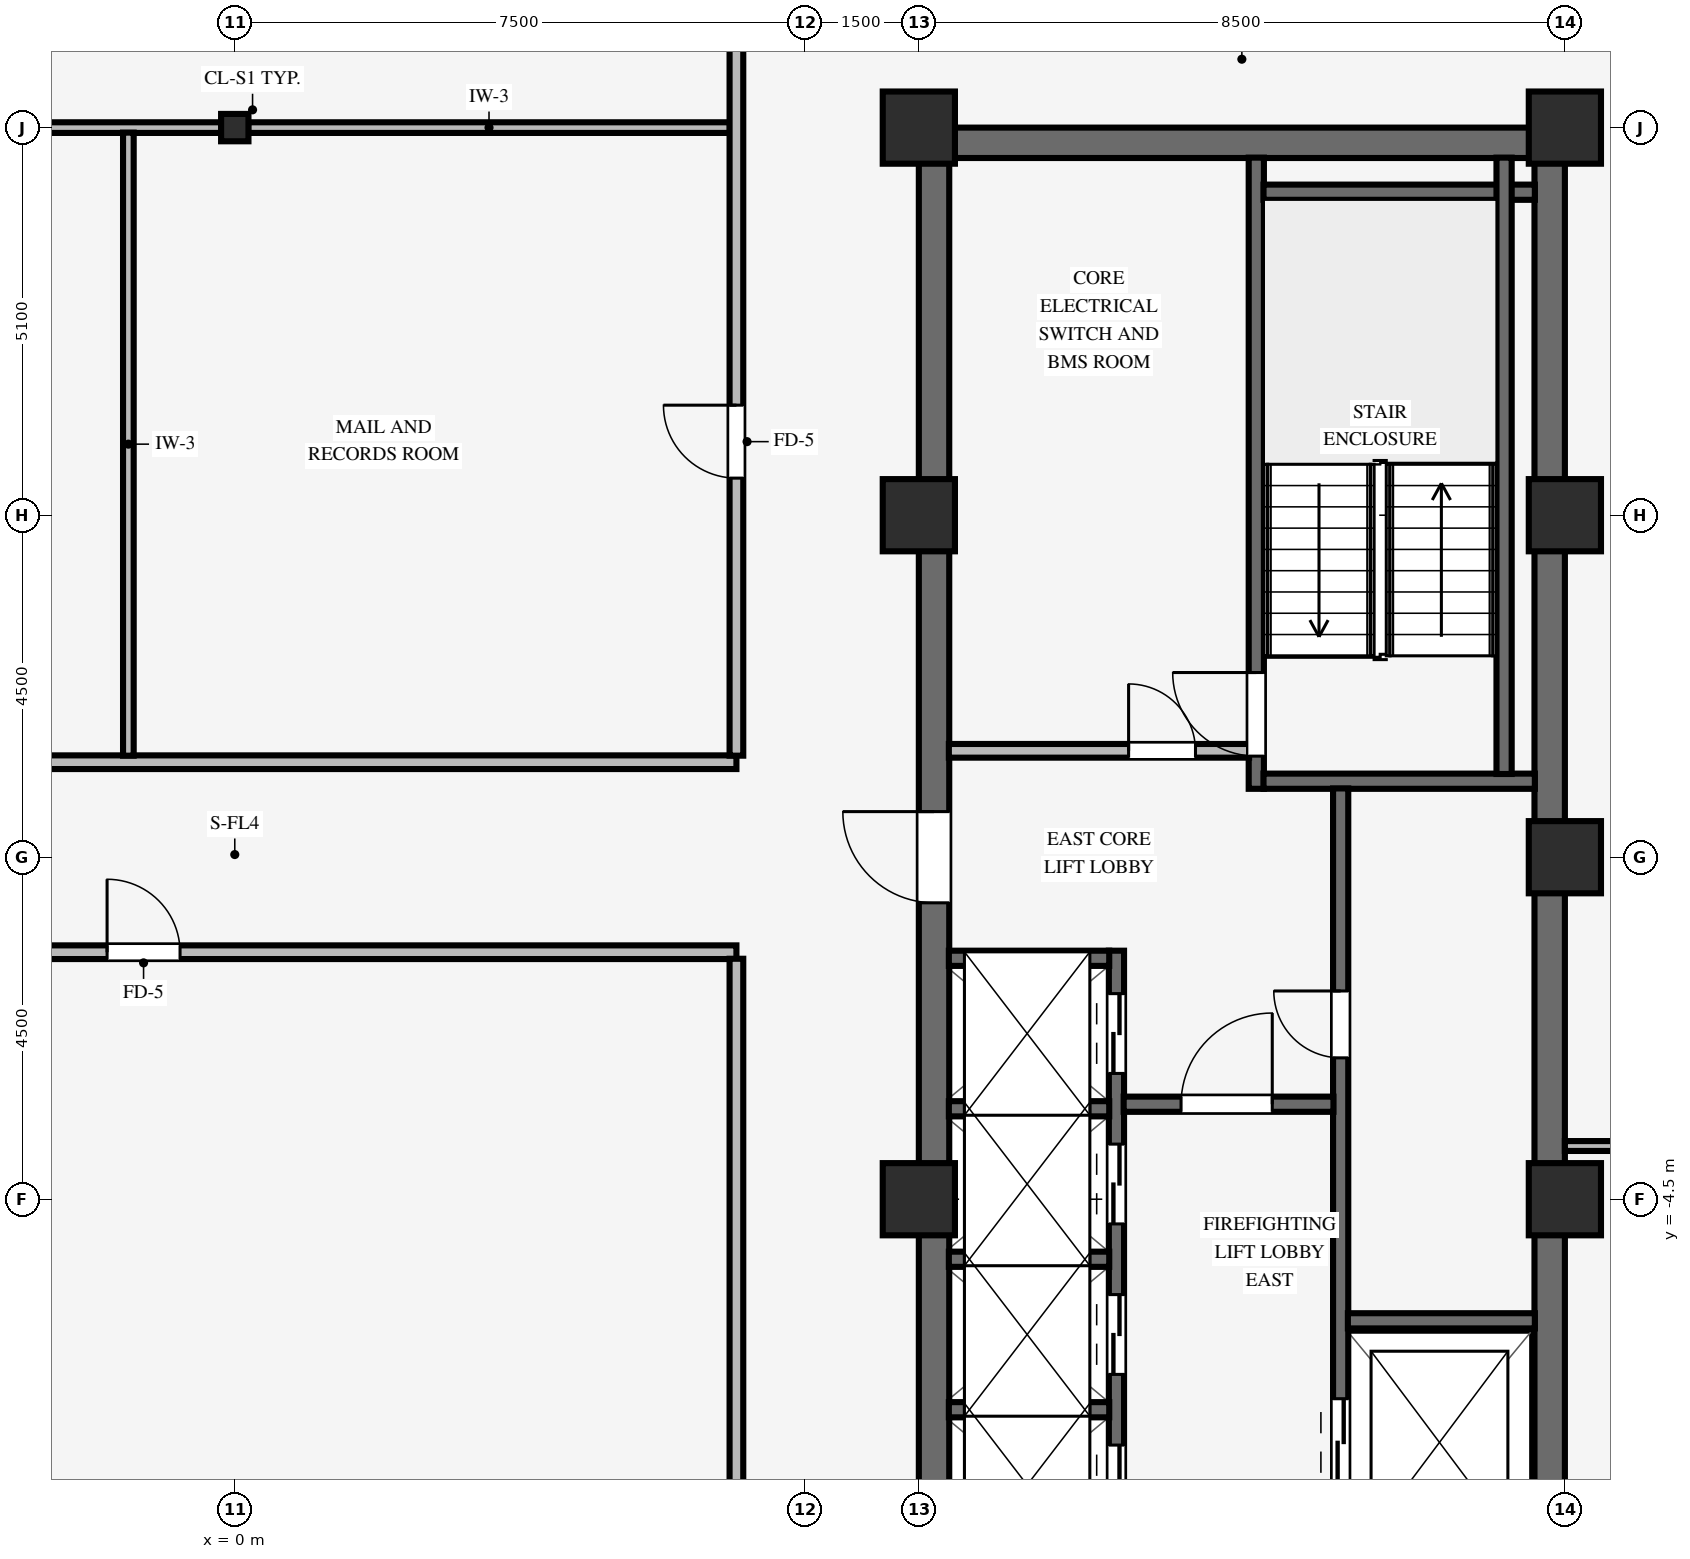
"""IFC4 building model, lengths in metres.
Left out: names, types, materials, properties, quantities, classifications, styles, units other than length and angle.
Written with IfcOpenShell. Run it as: python <this file> out.ifc"""

import sys

from ifc_helpers import new_model, si_unit, direction, frame, frame_2d, origin, origin_2d, place, context, subcontext, project, spatial, rectangle, i_section, extrude, source, transform, mapped, element, fill, save


model = new_model("IFC4")
c1 = context("Model", 3, precision=1e-05, world=origin(), true_north=direction((0.0, 1.0)))
c2 = subcontext(c1, "Body", "Model", "MODEL_VIEW")
j1 = project(units=[si_unit("LENGTHUNIT", "METRE"), si_unit("PLANEANGLEUNIT", "RADIAN")], contexts=[c1])
p1 = place(None, origin())
s1 = spatial("IfcSite", under=j1, at=p1, CompositionType="ELEMENT")
p2 = place(p1, origin())
s2 = spatial("IfcBuilding", under=s1, at=p2, CompositionType="ELEMENT")
p3 = place(p2, frame((0.0, 0.0, 134.8)))
s3 = spatial("IfcBuildingStorey", under=s2, at=p3, CompositionType="ELEMENT", Elevation=134.8)
p4 = place(p3, frame((9.0, 9.4, 0.0), z_axis=(0.0, 0.0, 1.0), x_axis=(1.0, 0.0, 0.0)))
e1 = element("IfcWall", 1, at=p4, inside=s3, PredefinedType="SHEAR", context=c2, shape_type="SweptSolid", body=[
    extrude(rectangle(XDim=8.5, YDim=0.4, at=frame_2d((4.25, 0.0))), origin(), (0.0, 0.0, 1.0), 3.37),
])
p5 = place(p3, frame((9.2, -9.205, 0.0), z_axis=(0.0, 0.0, 1.0), x_axis=(0.0, 1.0, 0.0)))
e2 = element("IfcWall", 2, at=p5, inside=s3, PredefinedType="SHEAR", context=c2, shape_type="SweptSolid", body=[
    extrude(rectangle(XDim=18.41, YDim=0.4, at=frame_2d((9.205, 0.0))), origin(), (0.0, 0.0, 1.0), 3.37),
])
p6 = place(p5, frame((8.605, 0.0, 0.0)))
e3 = element("IfcOpeningElement", 3, at=p6, cuts=e2, PredefinedType="OPENING", context=c2, shape_type="SweptSolid", body=[
    extrude(rectangle(XDim=1.2, YDim=2.15, at=frame_2d((0.6, 1.075))), frame((0.0, 0.21, 0.0), z_axis=(0.0, -1.0, 0.0), x_axis=(1.0, 0.0, 0.0)), (0.0, 0.0, 1.0), 0.42),
])
p7 = place(p3, frame((17.3, -9.205, 0.0), z_axis=(0.0, 0.0, 1.0), x_axis=(0.0, 1.0, 0.0)))
e4 = element("IfcWall", 4, at=p7, inside=s3, PredefinedType="SHEAR", context=c2, shape_type="SweptSolid", body=[
    extrude(rectangle(XDim=18.41, YDim=0.4, at=frame_2d((9.205, 0.0))), origin(), (0.0, 0.0, 1.0), 3.37),
])
for number, where, z_axis, x_axis in (
    (5, (9.0, -4.5, 0.0), (0.0, 0.0, 1.0), (1.0, 0.0, 0.0)),
    (6, (9.0, 4.5, 0.0), (0.0, 0.0, 1.0), (1.0, 0.0, 0.0)),
    (7, (9.0, 9.6, 0.0), (0.0, 0.0, 1.0), (1.0, 0.0, 0.0)),
    (8, (17.5, -4.5, 0.0), (0.0, 0.0, 1.0), (1.0, 0.0, 0.0)),
    (9, (17.5, 4.5, 0.0), (0.0, 0.0, 1.0), (1.0, 0.0, 0.0)),
    (10, (17.5, 9.6, 0.0), (0.0, 0.0, 1.0), (1.0, 0.0, 0.0)),
    (11, (17.5, 0.0, 0.0), (0.0, 0.0, 1.0), (1.0, 0.0, 0.0)),
):
    element("IfcColumn", number, at=place(p3, frame(where, z_axis=z_axis, x_axis=x_axis)), inside=s3, PredefinedType="COLUMN", context=c2, shape_type="SweptSolid", body=[
        extrude(rectangle(XDim=0.95, YDim=0.95, at=origin_2d()), origin(), (0.0, 0.0, 1.0), 3.37),
    ])
p8 = place(p3, frame((0.0, 9.6, 0.0), z_axis=(0.0, 0.0, 1.0), x_axis=(1.0, 0.0, 0.0)))
e12 = element("IfcColumn", 12, at=p8, inside=s3, PredefinedType="COLUMN", context=c2, shape_type="SweptSolid", body=[
    extrude(i_section(OverallWidth=0.36, OverallDepth=0.36, WebThickness=0.021, FlangeThickness=0.021, FilletRadius=0.018, at=origin_2d()), origin(), (0.0, 0.0, 1.0), 3.37),
])
p9 = place(p3, frame((13.44, 0.9, 0.0), z_axis=(0.0, 0.0, 1.0), x_axis=(0.0, 1.0, 0.0)))
e13 = element("IfcWall", 13, at=p9, inside=s3, PredefinedType="SHEAR", context=c2, shape_type="SweptSolid", body=[
    extrude(rectangle(XDim=8.305, YDim=0.2, at=frame_2d((4.153, 0.0))), origin(), (0.0, 0.0, 1.0), 3.37),
])
p10 = place(p9, frame((0.43, 0.0, 0.0)))
e14 = element("IfcOpeningElement", 14, at=p10, cuts=e13, PredefinedType="OPENING", context=c2, shape_type="SweptSolid", body=[
    extrude(rectangle(XDim=1.1, YDim=2.15, at=frame_2d((0.55, 1.075))), frame((0.0, 0.11, 0.0), z_axis=(0.0, -1.0, 0.0), x_axis=(1.0, 0.0, 0.0)), (0.0, 0.0, 1.0), 0.22),
])
for number, where, z_axis, x_axis in (
    (15, (13.535, 1.0, 0.0), (0.0, 0.0, 1.0), (1.0, 0.0, 0.0)),
    (16, (13.535, 8.75, 0.0), (0.0, 0.0, 1.0), (1.0, 0.0, 0.0)),
):
    element("IfcWall", number, at=place(p3, frame(where, z_axis=z_axis, x_axis=x_axis)), inside=s3, PredefinedType="SHEAR", context=c2, shape_type="SweptSolid", body=[
        extrude(rectangle(XDim=3.57, YDim=0.2, at=frame_2d((1.785, 0.0))), origin(), (0.0, 0.0, 1.0), 3.37),
    ])
p11 = place(p3, frame((16.7, 1.095, 0.0), z_axis=(0.0, 0.0, 1.0), x_axis=(0.0, 1.0, 0.0)))
e17 = element("IfcWall", 17, at=p11, inside=s3, PredefinedType="SHEAR", context=c2, shape_type="SweptSolid", body=[
    extrude(rectangle(XDim=8.11, YDim=0.2, at=frame_2d((4.055, 0.0))), origin(), (0.0, 0.0, 1.0), 3.37),
])
p12 = place(p3, frame((14.55, -9.205, 0.0), z_axis=(0.0, 0.0, 1.0), x_axis=(0.0, 1.0, 0.0)))
e18 = element("IfcWall", 18, at=p12, inside=s3, PredefinedType="SHEAR", context=c2, shape_type="SweptSolid", body=[
    extrude(rectangle(XDim=10.11, YDim=0.2, at=frame_2d((5.055, 0.0))), origin(), (0.0, 0.0, 1.0), 3.37),
])
p13 = place(p12, frame((6.565, 0.0, 0.0)))
e19 = element("IfcOpeningElement", 19, at=p13, cuts=e18, PredefinedType="OPENING", context=c2, shape_type="SweptSolid", body=[
    extrude(rectangle(XDim=0.88, YDim=2.1, at=frame_2d((0.44, 1.05))), frame((0.0, 0.11, 0.0), z_axis=(0.0, -1.0, 0.0), x_axis=(1.0, 0.0, 0.0)), (0.0, 0.0, 1.0), 0.22),
])
p14 = place(p12, frame((0.93, 0.0, 0.0)))
e20 = element("IfcOpeningElement", 20, at=p14, cuts=e18, PredefinedType="OPENING", context=c2, shape_type="SweptSolid", body=[
    extrude(rectangle(XDim=1.15, YDim=2.15, at=frame_2d((0.575, 1.075))), frame((0.0, 0.11, 0.0), z_axis=(0.0, -1.0, 0.0), x_axis=(1.0, 0.0, 0.0)), (0.0, 0.0, 1.0), 0.22),
])
p15 = place(p3, frame((14.645, -6.1, 0.0), z_axis=(0.0, 0.0, 1.0), x_axis=(1.0, 0.0, 0.0)))
e21 = element("IfcWall", 21, at=p15, inside=s3, PredefinedType="SHEAR", context=c2, shape_type="SweptSolid", body=[
    extrude(rectangle(XDim=2.46, YDim=0.2, at=frame_2d((1.23, 0.0))), origin(), (0.0, 0.0, 1.0), 3.37),
])
p16 = place(p3, frame((11.6, -9.205, 0.0), z_axis=(0.0, 0.0, 1.0), x_axis=(0.0, 1.0, 0.0)))
e22 = element("IfcWall", 22, at=p16, inside=s3, PredefinedType="SHEAR", context=c2, shape_type="SweptSolid", body=[
    extrude(rectangle(XDim=7.975, YDim=0.2, at=frame_2d((3.988, 0.0))), origin(), (0.0, 0.0, 1.0), 3.37),
])
p17 = place(p16, frame((0.42, 0.0, 0.0)))
e23 = element("IfcOpeningElement", 23, at=p17, cuts=e22, PredefinedType="OPENING", context=c2, shape_type="SweptSolid", body=[
    extrude(rectangle(XDim=1.05, YDim=2.15, at=frame_2d((0.525, 1.075))), frame((0.0, 0.11, 0.0), z_axis=(0.0, -1.0, 0.0), x_axis=(1.0, 0.0, 0.0)), (0.0, 0.0, 1.0), 0.22),
])
p18 = place(p16, frame((2.4, 0.0, 0.0)))
e24 = element("IfcOpeningElement", 24, at=p18, cuts=e22, PredefinedType="OPENING", context=c2, shape_type="SweptSolid", body=[
    extrude(rectangle(XDim=1.05, YDim=2.15, at=frame_2d((0.525, 1.075))), frame((0.0, 0.11, 0.0), z_axis=(0.0, -1.0, 0.0), x_axis=(1.0, 0.0, 0.0)), (0.0, 0.0, 1.0), 0.22),
])
p19 = place(p16, frame((4.38, 0.0, 0.0)))
e25 = element("IfcOpeningElement", 25, at=p19, cuts=e22, PredefinedType="OPENING", context=c2, shape_type="SweptSolid", body=[
    extrude(rectangle(XDim=1.05, YDim=2.15, at=frame_2d((0.525, 1.075))), frame((0.0, 0.11, 0.0), z_axis=(0.0, -1.0, 0.0), x_axis=(1.0, 0.0, 0.0)), (0.0, 0.0, 1.0), 0.22),
])
p20 = place(p16, frame((6.36, 0.0, 0.0)))
e26 = element("IfcOpeningElement", 26, at=p20, cuts=e22, PredefinedType="OPENING", context=c2, shape_type="SweptSolid", body=[
    extrude(rectangle(XDim=1.05, YDim=2.15, at=frame_2d((0.525, 1.075))), frame((0.0, 0.11, 0.0), z_axis=(0.0, -1.0, 0.0), x_axis=(1.0, 0.0, 0.0)), (0.0, 0.0, 1.0), 0.22),
])
p21 = place(p3, frame((11.695, -3.25, 0.0), z_axis=(0.0, 0.0, 1.0), x_axis=(1.0, 0.0, 0.0)))
e27 = element("IfcWall", 27, at=p21, inside=s3, PredefinedType="SHEAR", context=c2, shape_type="SweptSolid", body=[
    extrude(rectangle(XDim=2.76, YDim=0.2, at=frame_2d((1.38, 0.0))), origin(), (0.0, 0.0, 1.0), 3.37),
])
p22 = place(p21, frame((0.755, 0.0, 0.0)))
e28 = element("IfcOpeningElement", 28, at=p22, cuts=e27, PredefinedType="OPENING", context=c2, shape_type="SweptSolid", body=[
    extrude(rectangle(XDim=1.2, YDim=2.15, at=frame_2d((0.6, 1.075))), frame((0.0, 0.11, 0.0), z_axis=(0.0, -1.0, 0.0), x_axis=(1.0, 0.0, 0.0)), (0.0, 0.0, 1.0), 0.22),
])
for number, where, z_axis, x_axis in (
    (29, (9.395, -7.27, 0.0), (0.0, 0.0, 1.0), (1.0, 0.0, 0.0)),
    (30, (9.395, -5.29, 0.0), (0.0, 0.0, 1.0), (1.0, 0.0, 0.0)),
    (31, (9.395, -3.31, 0.0), (0.0, 0.0, 1.0), (1.0, 0.0, 0.0)),
    (32, (9.395, -1.33, 0.0), (0.0, 0.0, 1.0), (1.0, 0.0, 0.0)),
):
    element("IfcWall", number, at=place(p3, frame(where, z_axis=z_axis, x_axis=x_axis)), inside=s3, PredefinedType="SHEAR", context=c2, shape_type="SweptSolid", body=[
        extrude(rectangle(XDim=2.11, YDim=0.2, at=frame_2d((1.055, 0.0))), origin(), (0.0, 0.0, 1.0), 3.37),
    ])
p23 = place(p3, frame((9.395, 1.4, 0.0), z_axis=(0.0, 0.0, 1.0), x_axis=(1.0, 0.0, 0.0)))
e33 = element("IfcWall", 33, at=p23, inside=s3, PredefinedType="PARTITIONING", context=c2, shape_type="SweptSolid", body=[
    extrude(rectangle(XDim=3.95, YDim=0.18, at=frame_2d((1.975, 0.0))), origin(), (0.0, 0.0, 1.0), 3.36),
])
p24 = place(p23, frame((2.365, 0.0, 0.0)))
e34 = element("IfcOpeningElement", 34, at=p24, cuts=e33, PredefinedType="OPENING", context=c2, shape_type="SweptSolid", body=[
    extrude(rectangle(XDim=0.88, YDim=2.1, at=frame_2d((0.44, 1.05))), frame((0.0, 0.1, 0.0), z_axis=(0.0, -1.0, 0.0), x_axis=(1.0, 0.0, 0.0)), (0.0, 0.0, 1.0), 0.2),
])
p25 = place(p3, frame((17.5, -3.8, 0.0), z_axis=(0.0, 0.0, 1.0), x_axis=(1.0, 0.0, 0.0)))
e35 = element("IfcWall", 35, at=p25, inside=s3, PredefinedType="PARTITIONING", context=c2, shape_type="SweptSolid", body=[
    extrude(rectangle(XDim=8.58, YDim=0.13, at=frame_2d((4.29, 0.0))), origin(), (0.0, 0.0, 1.0), 3.36),
])
p26 = place(p3, frame((-9.0, -1.25, 0.0), z_axis=(0.0, 0.0, 1.0), x_axis=(1.0, 0.0, 0.0)))
e36 = element("IfcWall", 36, at=p26, inside=s3, PredefinedType="PARTITIONING", context=c2, shape_type="SweptSolid", body=[
    extrude(rectangle(XDim=15.6, YDim=0.18, at=frame_2d((7.8, 0.0))), origin(), (0.0, 0.0, 1.0), 3.36),
])
p27 = place(p26, frame((7.32, 0.0, 0.0)))
e37 = element("IfcOpeningElement", 37, at=p27, cuts=e36, PredefinedType="OPENING", context=c2, shape_type="SweptSolid", body=[
    extrude(rectangle(XDim=0.96, YDim=2.1, at=frame_2d((0.48, 1.05))), frame((0.0, 0.1, 0.0), z_axis=(0.0, -1.0, 0.0), x_axis=(1.0, 0.0, 0.0)), (0.0, 0.0, 1.0), 0.2),
])
p28 = place(p3, frame((-9.0, 1.25, 0.0), z_axis=(0.0, 0.0, 1.0), x_axis=(1.0, 0.0, 0.0)))
e38 = element("IfcWall", 38, at=p28, inside=s3, PredefinedType="PARTITIONING", context=c2, shape_type="SweptSolid", body=[
    extrude(rectangle(XDim=15.6, YDim=0.18, at=frame_2d((7.8, 0.0))), origin(), (0.0, 0.0, 1.0), 3.36),
])
p29 = place(p28, frame((3.32, 0.0, 0.0)))
e39 = element("IfcOpeningElement", 39, at=p29, cuts=e38, PredefinedType="OPENING", context=c2, shape_type="SweptSolid", body=[
    extrude(rectangle(XDim=0.96, YDim=2.1, at=frame_2d((0.48, 1.05))), frame((0.0, 0.1, 0.0), z_axis=(0.0, -1.0, 0.0), x_axis=(1.0, 0.0, 0.0)), (0.0, 0.0, 1.0), 0.2),
])
p30 = place(p3, frame((-8.529, 9.6, 0.0), z_axis=(0.0, 0.0, 1.0), x_axis=(1.0, 0.0, 0.0)))
e40 = element("IfcWall", 40, at=p30, inside=s3, PredefinedType="PARTITIONING", context=c2, shape_type="SweptSolid", body=[
    extrude(rectangle(XDim=8.353, YDim=0.14, at=frame_2d((4.177, 0.0))), origin(), (0.0, 0.0, 1.0), 2.405),
])
p31 = place(p3, frame((0.176, 9.6, 0.0), z_axis=(0.0, 0.0, 1.0), x_axis=(1.0, 0.0, 0.0)))
e41 = element("IfcWall", 41, at=p31, inside=s3, PredefinedType="PARTITIONING", context=c2, shape_type="SweptSolid", body=[
    extrude(rectangle(XDim=6.338, YDim=0.14, at=frame_2d((3.169, 0.0))), origin(), (0.0, 0.0, 1.0), 2.405),
])
p32 = place(p3, frame((-1.4, 1.336, 0.0), z_axis=(0.0, 0.0, 1.0), x_axis=(0.0, 1.0, 0.0)))
e42 = element("IfcWall", 42, at=p32, inside=s3, PredefinedType="PARTITIONING", context=c2, shape_type="SweptSolid", body=[
    extrude(rectangle(XDim=8.198, YDim=0.14, at=frame_2d((4.099, 0.0))), origin(), (0.0, 0.0, 1.0), 3.36),
])
p33 = place(p3, frame((6.6, -13.414, 0.0), z_axis=(0.0, 0.0, 1.0), x_axis=(0.0, 1.0, 0.0)))
e43 = element("IfcWall", 43, at=p33, inside=s3, PredefinedType="PARTITIONING", context=c2, shape_type="SweptSolid", body=[
    extrude(rectangle(XDim=12.078, YDim=0.18, at=frame_2d((6.039, 0.0))), origin(), (0.0, 0.0, 1.0), 3.36),
])
p34 = place(p3, frame((6.6, 1.336, 0.0), z_axis=(0.0, 0.0, 1.0), x_axis=(0.0, 1.0, 0.0)))
e44 = element("IfcWall", 44, at=p34, inside=s3, PredefinedType="PARTITIONING", context=c2, shape_type="SweptSolid", body=[
    extrude(rectangle(XDim=12.078, YDim=0.18, at=frame_2d((6.039, 0.0))), origin(), (0.0, 0.0, 1.0), 3.36),
])
p35 = place(p34, frame((3.652, 0.0, 0.0)))
e45 = element("IfcOpeningElement", 45, at=p35, cuts=e44, PredefinedType="OPENING", context=c2, shape_type="SweptSolid", body=[
    extrude(rectangle(XDim=0.96, YDim=2.1, at=frame_2d((0.48, 1.05))), frame((0.0, 0.1, 0.0), z_axis=(0.0, -1.0, 0.0), x_axis=(1.0, 0.0, 0.0)), (0.0, 0.0, 1.0), 0.2),
])
m1 = source(origin(), c2, "Body", "SweptSolid", [
    extrude(rectangle(XDim=1.1, YDim=2.15, at=frame_2d((0.55, 1.075))), frame((0.0, 0.025, 0.0), z_axis=(0.0, -1.0, 0.0), x_axis=(1.0, 0.0, 0.0)), (0.0, 0.0, 1.0), 0.05),
])
p36 = place(p10, origin())
e46 = element("IfcDoor", 46, at=p36, inside=s3, OperationType="SINGLE_SWING_RIGHT", PredefinedType="DOOR", context=c2, shape_type="MappedRepresentation", body=[
    mapped(m1, transform((0.0, 0.0, 0.0), scale=1.0)),
])
fill(e14, e46)
m2 = source(origin(), c2, "Body", "SweptSolid", [
    extrude(rectangle(XDim=0.88, YDim=2.1, at=frame_2d((0.44, 1.05))), frame((0.0, 0.025, 0.0), z_axis=(0.0, -1.0, 0.0), x_axis=(1.0, 0.0, 0.0)), (0.0, 0.0, 1.0), 0.05),
])
p37 = place(p13, origin())
e47 = element("IfcDoor", 47, at=p37, inside=s3, OperationType="SINGLE_SWING_RIGHT", PredefinedType="DOOR", context=c2, shape_type="MappedRepresentation", body=[
    mapped(m2, transform((0.0, 0.0, 0.0), scale=1.0)),
])
fill(e19, e47)
m3 = source(origin(), c2, "Body", "SweptSolid", [
    extrude(rectangle(XDim=1.2, YDim=2.15, at=frame_2d((0.6, 1.075))), frame((0.0, 0.025, 0.0), z_axis=(0.0, -1.0, 0.0), x_axis=(1.0, 0.0, 0.0)), (0.0, 0.0, 1.0), 0.05),
])
p38 = place(p22, origin())
e48 = element("IfcDoor", 48, at=p38, inside=s3, OperationType="SINGLE_SWING_RIGHT", PredefinedType="DOOR", context=c2, shape_type="MappedRepresentation", body=[
    mapped(m3, transform((0.0, 0.0, 0.0), scale=1.0)),
])
fill(e28, e48)
p39 = place(p6, origin())
e49 = element("IfcDoor", 49, at=p39, inside=s3, OperationType="SINGLE_SWING_RIGHT", PredefinedType="DOOR", context=c2, shape_type="MappedRepresentation", body=[
    mapped(m3, transform((0.0, 0.0, 0.0), scale=1.0)),
])
fill(e3, e49)
p40 = place(p24, origin())
e50 = element("IfcDoor", 50, at=p40, inside=s3, OperationType="SINGLE_SWING_LEFT", PredefinedType="DOOR", context=c2, shape_type="MappedRepresentation", body=[
    mapped(m2, transform((0.0, 0.0, 0.0), scale=1.0)),
])
fill(e34, e50)
m4 = source(origin(), c2, "Body", "SweptSolid", [
    extrude(rectangle(XDim=1.15, YDim=2.15, at=frame_2d((0.575, 1.075))), frame((0.0, 0.025, 0.0), z_axis=(0.0, -1.0, 0.0), x_axis=(1.0, 0.0, 0.0)), (0.0, 0.0, 1.0), 0.05),
])
p41 = place(p14, origin())
e51 = element("IfcDoor", 51, at=p41, inside=s3, OperationType="DOUBLE_DOOR_SLIDING", PredefinedType="DOOR", context=c2, shape_type="MappedRepresentation", body=[
    mapped(m4, transform((0.0, 0.0, 0.0), scale=1.0)),
])
fill(e20, e51)
m5 = source(origin(), c2, "Body", "SweptSolid", [
    extrude(rectangle(XDim=1.05, YDim=2.15, at=frame_2d((0.525, 1.075))), frame((0.0, 0.025, 0.0), z_axis=(0.0, -1.0, 0.0), x_axis=(1.0, 0.0, 0.0)), (0.0, 0.0, 1.0), 0.05),
])
p42 = place(p17, origin())
e52 = element("IfcDoor", 52, at=p42, inside=s3, OperationType="DOUBLE_DOOR_SLIDING", PredefinedType="DOOR", context=c2, shape_type="MappedRepresentation", body=[
    mapped(m5, transform((0.0, 0.0, 0.0), scale=1.0)),
])
fill(e23, e52)
p43 = place(p18, origin())
e53 = element("IfcDoor", 53, at=p43, inside=s3, OperationType="DOUBLE_DOOR_SLIDING", PredefinedType="DOOR", context=c2, shape_type="MappedRepresentation", body=[
    mapped(m5, transform((0.0, 0.0, 0.0), scale=1.0)),
])
fill(e24, e53)
p44 = place(p19, origin())
e54 = element("IfcDoor", 54, at=p44, inside=s3, OperationType="DOUBLE_DOOR_SLIDING", PredefinedType="DOOR", context=c2, shape_type="MappedRepresentation", body=[
    mapped(m5, transform((0.0, 0.0, 0.0), scale=1.0)),
])
fill(e25, e54)
p45 = place(p20, origin())
e55 = element("IfcDoor", 55, at=p45, inside=s3, OperationType="DOUBLE_DOOR_SLIDING", PredefinedType="DOOR", context=c2, shape_type="MappedRepresentation", body=[
    mapped(m5, transform((0.0, 0.0, 0.0), scale=1.0)),
])
fill(e26, e55)
m6 = source(origin(), c2, "Body", "SweptSolid", [
    extrude(rectangle(XDim=0.96, YDim=2.1, at=frame_2d((0.48, 1.05))), frame((0.0, 0.025, 0.0), z_axis=(0.0, -1.0, 0.0), x_axis=(1.0, 0.0, 0.0)), (0.0, 0.0, 1.0), 0.05),
])
p46 = place(p27, origin())
e56 = element("IfcDoor", 56, at=p46, inside=s3, OperationType="SINGLE_SWING_LEFT", PredefinedType="DOOR", context=c2, shape_type="MappedRepresentation", body=[
    mapped(m6, transform((0.0, 0.0, 0.0), scale=1.0)),
])
fill(e37, e56)
p47 = place(p35, origin())
e57 = element("IfcDoor", 57, at=p47, inside=s3, OperationType="SINGLE_SWING_RIGHT", PredefinedType="DOOR", context=c2, shape_type="MappedRepresentation", body=[
    mapped(m6, transform((0.0, 0.0, 0.0), scale=1.0)),
])
fill(e45, e57)
save(model, sys.argv[1])
